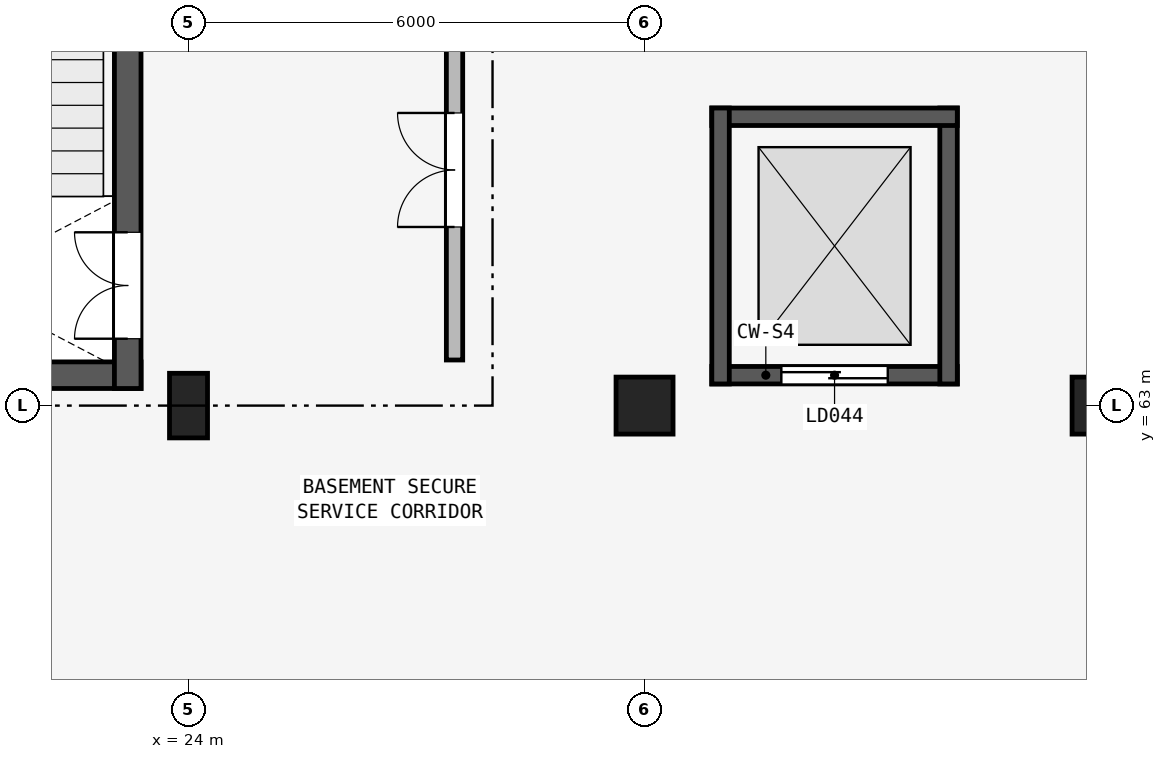
"""IFC4 building model, lengths in metres.
Left out: names, types, materials, properties, quantities, classifications, styles, units other than length and angle.
Written with IfcOpenShell. Run it as: python <this file> out.ifc"""

import sys

from ifc_helpers import new_model, si_unit, direction, frame, frame_2d, origin, origin_2d, place, context, subcontext, project, spatial, rectangle, extrude, element, fill, save


model = new_model("IFC4")
c1 = context("Model", 3, precision=1e-05, world=origin(), true_north=direction((0.0, 1.0)))
c2 = subcontext(c1, "Body", "Model", "MODEL_VIEW")
j1 = project(units=[si_unit("LENGTHUNIT", "METRE"), si_unit("PLANEANGLEUNIT", "RADIAN")], contexts=[c1])
p1 = place(None, origin())
s1 = spatial("IfcSite", under=j1, at=p1, CompositionType="ELEMENT")
p2 = place(p1, origin())
s2 = spatial("IfcBuilding", under=s1, at=p2, CompositionType="ELEMENT")
p3 = place(p2, frame((0.0, 0.0, -4.5)))
s3 = spatial("IfcBuildingStorey", under=s2, at=p3, CompositionType="ELEMENT", Elevation=-4.5)
p4 = place(p3, frame((24.0, 63.0, 0.0), z_axis=(0.0, 0.0, 1.0), x_axis=(1.0, 0.0, 0.0)))
e1 = element("IfcColumn", 1, at=p4, inside=s3, PredefinedType="COLUMN", context=c2, shape_type="SweptSolid", body=[
    extrude(rectangle(XDim=0.5, YDim=0.85, at=origin_2d()), origin(), (0.0, 0.0, 1.0), 4.5),
])
for number, where, z_axis, x_axis in (
    (2, (30.0, 63.0, 0.0), (0.0, 0.0, 1.0), (1.0, 0.0, 0.0)),
    (3, (36.0, 63.0, 0.0), (0.0, 0.0, 1.0), (1.0, 0.0, 0.0)),
):
    element("IfcColumn", number, at=place(p3, frame(where, z_axis=z_axis, x_axis=x_axis)), inside=s3, PredefinedType="COLUMN", context=c2, shape_type="SweptSolid", body=[
        extrude(rectangle(XDim=0.75, YDim=0.75, at=origin_2d()), origin(), (0.0, 0.0, 1.0), 4.5),
    ])
p5 = place(p3, frame((18.525, 63.4, 0.0), z_axis=(0.0, 0.0, 1.0), x_axis=(1.0, 0.0, 0.0)))
e4 = element("IfcWall", 4, at=p5, inside=s3, PredefinedType="SHEAR", context=c2, shape_type="SweptSolid", body=[
    extrude(rectangle(XDim=4.85, YDim=0.35, at=frame_2d((2.425, 0.0))), origin(), (0.0, 0.0, 1.0), 4.36),
])
p6 = place(p3, frame((23.2, 63.225, 0.0), z_axis=(0.0, 0.0, 1.0), x_axis=(0.0, 1.0, 0.0)))
e5 = element("IfcWall", 5, at=p6, inside=s3, PredefinedType="SHEAR", context=c2, shape_type="SweptSolid", body=[
    extrude(rectangle(XDim=9.65, YDim=0.35, at=frame_2d((4.825, 0.0))), origin(), (0.0, 0.0, 1.0), 4.36),
])
p7 = place(p6, frame((0.655, 0.0, 0.0)))
e6 = element("IfcOpeningElement", 6, at=p7, cuts=e5, PredefinedType="OPENING", context=c2, shape_type="SweptSolid", body=[
    extrude(rectangle(XDim=1.4, YDim=2.2, at=frame_2d((0.7, 1.1))), frame((0.0, 0.185, 0.0), z_axis=(0.0, -1.0, 0.0), x_axis=(1.0, 0.0, 0.0)), (0.0, 0.0, 1.0), 0.37),
])
p8 = place(p3, frame((27.5, 63.6, 0.0), z_axis=(0.0, 0.0, 1.0), x_axis=(0.0, 1.0, 0.0)))
e7 = element("IfcWall", 7, at=p8, inside=s3, PredefinedType="PARTITIONING", context=c2, shape_type="SweptSolid", body=[
    extrude(rectangle(XDim=5.0, YDim=0.215, at=frame_2d((2.5, 0.0))), origin(), (0.0, 0.0, 1.0), 4.19),
])
p9 = place(p8, frame((1.75, 0.0, 0.0)))
e8 = element("IfcOpeningElement", 8, at=p9, cuts=e7, PredefinedType="OPENING", context=c2, shape_type="SweptSolid", body=[
    extrude(rectangle(XDim=1.5, YDim=2.15, at=frame_2d((0.75, 1.075))), frame((0.0, 0.117, 0.0), z_axis=(0.0, -1.0, 0.0), x_axis=(1.0, 0.0, 0.0)), (0.0, 0.0, 1.0), 0.235),
])
p10 = place(p3, frame((30.885, 63.4, 0.0), z_axis=(0.0, 0.0, 1.0), x_axis=(1.0, 0.0, 0.0)))
e9 = element("IfcWall", 9, at=p10, inside=s3, PredefinedType="SHEAR", context=c2, shape_type="SweptSolid", body=[
    extrude(rectangle(XDim=3.23, YDim=0.23, at=frame_2d((1.615, 0.0))), origin(), (0.0, 0.0, 1.0), 4.5),
])
p11 = place(p10, frame((0.915, 0.0, 0.0)))
e10 = element("IfcOpeningElement", 10, at=p11, cuts=e9, PredefinedType="OPENING", context=c2, shape_type="SweptSolid", body=[
    extrude(rectangle(XDim=1.4, YDim=2.3, at=frame_2d((0.7, 1.15))), frame((0.0, 0.125, 0.0), z_axis=(0.0, -1.0, 0.0), x_axis=(1.0, 0.0, 0.0)), (0.0, 0.0, 1.0), 0.25),
])
p12 = place(p3, frame((34.0, 63.285, 0.0), z_axis=(0.0, 0.0, 1.0), x_axis=(0.0, 1.0, 0.0)))
e11 = element("IfcWall", 11, at=p12, inside=s3, PredefinedType="SHEAR", context=c2, shape_type="SweptSolid", body=[
    extrude(rectangle(XDim=3.63, YDim=0.23, at=frame_2d((1.815, 0.0))), origin(), (0.0, 0.0, 1.0), 4.5),
])
p13 = place(p3, frame((34.115, 66.8, 0.0), z_axis=(0.0, 0.0, 1.0), x_axis=(-1.0, 0.0, 0.0)))
e12 = element("IfcWall", 12, at=p13, inside=s3, PredefinedType="SHEAR", context=c2, shape_type="SweptSolid", body=[
    extrude(rectangle(XDim=3.23, YDim=0.23, at=frame_2d((1.615, 0.0))), origin(), (0.0, 0.0, 1.0), 4.5),
])
p14 = place(p3, frame((31.0, 66.915, 0.0), z_axis=(0.0, 0.0, 1.0), x_axis=(0.0, -1.0, 0.0)))
e13 = element("IfcWall", 13, at=p14, inside=s3, PredefinedType="SHEAR", context=c2, shape_type="SweptSolid", body=[
    extrude(rectangle(XDim=3.63, YDim=0.23, at=frame_2d((1.815, 0.0))), origin(), (0.0, 0.0, 1.0), 4.5),
])
p15 = place(p7, origin())
e14 = element("IfcDoor", 14, at=p15, inside=s3, OperationType="DOUBLE_DOOR_SINGLE_SWING", PredefinedType="DOOR", context=c2, shape_type="SweptSolid", body=[
    extrude(rectangle(XDim=1.4, YDim=2.2, at=frame_2d((0.7, 1.1))), frame((0.0, 0.025, 0.0), z_axis=(0.0, -1.0, 0.0), x_axis=(1.0, 0.0, 0.0)), (0.0, 0.0, 1.0), 0.05),
])
fill(e6, e14)
p16 = place(p9, origin())
e15 = element("IfcDoor", 15, at=p16, inside=s3, OperationType="DOUBLE_DOOR_SINGLE_SWING", PredefinedType="DOOR", context=c2, shape_type="SweptSolid", body=[
    extrude(rectangle(XDim=1.5, YDim=2.15, at=frame_2d((0.75, 1.075))), frame((0.0, 0.025, 0.0), z_axis=(0.0, -1.0, 0.0), x_axis=(1.0, 0.0, 0.0)), (0.0, 0.0, 1.0), 0.05),
])
fill(e8, e15)
p17 = place(p11, origin())
e16 = element("IfcDoor", 16, at=p17, inside=s3, OperationType="SLIDING_TO_LEFT", PredefinedType="DOOR", context=c2, shape_type="SweptSolid", body=[
    extrude(rectangle(XDim=1.4, YDim=2.3, at=frame_2d((0.7, 1.15))), frame((0.0, 0.025, 0.0), z_axis=(0.0, -1.0, 0.0), x_axis=(1.0, 0.0, 0.0)), (0.0, 0.0, 1.0), 0.05),
])
fill(e10, e16)
save(model, sys.argv[1])
